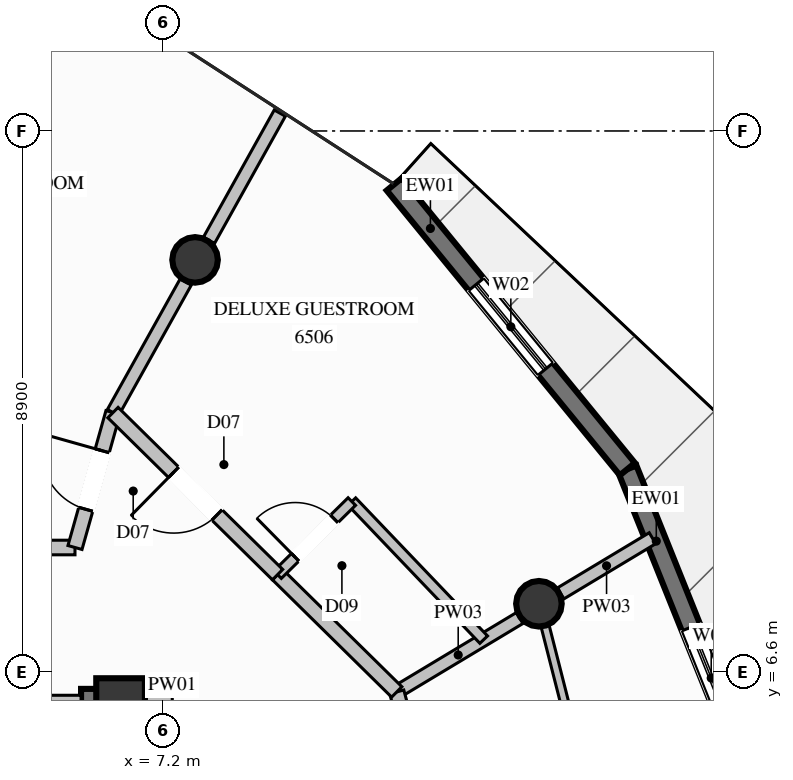
"""IFC4 building model, lengths in metres.
Left out: names, types, materials, properties, quantities, classifications, styles, units other than length and angle.
Written with IfcOpenShell. Run it as: python <this file> out.ifc"""

import sys

from ifc_helpers import new_model, si_unit, direction, frame, frame_2d, origin, origin_2d, place, context, subcontext, project, spatial, rectangle, circle, extrude, element, fill, save


model = new_model("IFC4")
c1 = context("Model", 3, precision=1e-05, world=origin(), true_north=direction((0.0, 1.0)))
c2 = subcontext(c1, "Body", "Model", "MODEL_VIEW")
j1 = project(units=[si_unit("LENGTHUNIT", "METRE"), si_unit("PLANEANGLEUNIT", "RADIAN")], contexts=[c1])
p1 = place(None, origin())
s1 = spatial("IfcSite", under=j1, at=p1, CompositionType="ELEMENT")
p2 = place(p1, origin())
s2 = spatial("IfcBuilding", under=s1, at=p2, CompositionType="ELEMENT")
p3 = place(p2, frame((0.0, 0.0, 243.0)))
s3 = spatial("IfcBuildingStorey", under=s2, at=p3, CompositionType="ELEMENT", Elevation=243.0)
p4 = place(p3, frame((6.5, 6.1, 0.0), z_axis=(0.0, 0.0, 1.0), x_axis=(1.0, 0.0, 0.0)))
e1 = element("IfcColumn", 1, at=p4, inside=s3, PredefinedType="COLUMN", context=c2, shape_type="SweptSolid", body=[
    extrude(rectangle(XDim=0.8, YDim=0.8, at=origin_2d()), origin(), (0.0, 0.0, 1.0), 3.8),
])
p5 = place(p3, frame((5.85, 6.1, 0.0), z_axis=(0.0, 0.0, 1.0), x_axis=(1.0, 0.0, 0.0)))
e2 = element("IfcWall", 2, at=p5, inside=s3, PredefinedType="SHEAR", context=c2, shape_type="SweptSolid", body=[
    extrude(rectangle(XDim=0.425, YDim=0.45, at=frame_2d((0.212, 0.0))), origin(), (0.0, 0.0, 1.0), 3.8),
])
p6 = place(p3, frame((6.5, 3.35, 0.0), z_axis=(0.0, 0.0, 1.0), x_axis=(0.0, 1.0, 0.0)))
e3 = element("IfcWall", 3, at=p6, inside=s3, PredefinedType="SHEAR", context=c2, shape_type="SweptSolid", body=[
    extrude(rectangle(XDim=2.975, YDim=0.45, at=frame_2d((1.487, 0.0))), origin(), (0.0, 0.0, 1.0), 3.8),
])
for number, where, z_axis, x_axis in (
    (4, (13.38, 7.725, 0.0), (0.0, 0.0, 1.0), (1.0, 0.0, 0.0)),
    (5, (7.725, 13.38, 0.0), (0.0, 0.0, 1.0), (1.0, 0.0, 0.0)),
):
    element("IfcColumn", number, at=place(p3, frame(where, z_axis=z_axis, x_axis=x_axis)), inside=s3, PredefinedType="COLUMN", context=c2, shape_type="SweptSolid", body=[
        extrude(circle(Radius=0.375, at=origin_2d()), origin(), (0.0, 0.0, 1.0), 3.8),
    ])
p7 = place(p3, frame((14.835, 9.939, 0.0), z_axis=(0.0, 0.0, 1.0), x_axis=(0.372412492589, -0.928067311871, 0.0)))
e6 = element("IfcWall", 6, at=p7, inside=s3, PredefinedType="SOLIDWALL", context=c2, shape_type="SweptSolid", body=[
    extrude(rectangle(XDim=6.095, YDim=0.32, at=frame_2d((3.048, 0.0))), origin(), (0.0, 0.0, 1.0), 3.57),
])
p8 = place(p7, frame((2.802, 0.0, 0.35)))
e7 = element("IfcOpeningElement", 7, at=p8, cuts=e6, PredefinedType="OPENING", context=c2, shape_type="SweptSolid", body=[
    extrude(rectangle(XDim=1.8, YDim=2.6, at=frame_2d((0.9, 1.3))), frame((0.0, 0.17, 0.0), z_axis=(0.0, -1.0, 0.0), x_axis=(1.0, 0.0, 0.0)), (0.0, 0.0, 1.0), 0.34),
])
p9 = place(p3, frame((11.001, 14.623, 0.0), z_axis=(0.0, 0.0, 1.0), x_axis=(0.633391522875, -0.773831492478, 0.0)))
e8 = element("IfcWall", 8, at=p9, inside=s3, PredefinedType="SOLIDWALL", context=c2, shape_type="SweptSolid", body=[
    extrude(rectangle(XDim=6.053, YDim=0.32, at=frame_2d((3.027, 0.0))), origin(), (0.0, 0.0, 1.0), 3.57),
])
p10 = place(p9, frame((2.127, 0.0, 0.35)))
e9 = element("IfcOpeningElement", 9, at=p10, cuts=e8, PredefinedType="OPENING", context=c2, shape_type="SweptSolid", body=[
    extrude(rectangle(XDim=1.8, YDim=2.6, at=frame_2d((0.9, 1.3))), frame((0.0, 0.17, 0.0), z_axis=(0.0, -1.0, 0.0), x_axis=(1.0, 0.0, 0.0)), (0.0, 0.0, 1.0), 0.34),
])
p11 = place(p3, frame((-5.75, 8.65, 0.0), z_axis=(0.0, 0.0, 1.0), x_axis=(1.0, 0.0, 0.0)))
e10 = element("IfcWall", 10, at=p11, inside=s3, PredefinedType="PARTITIONING", context=c2, shape_type="SweptSolid", body=[
    extrude(rectangle(XDim=11.5, YDim=0.24, at=frame_2d((5.75, 0.0))), origin(), (0.0, 0.0, 1.0), 3.57),
])
p12 = place(p3, frame((3.0, 6.1, 0.0), z_axis=(0.0, 0.0, 1.0), x_axis=(1.0, 0.0, 0.0)))
e11 = element("IfcWall", 11, at=p12, inside=s3, PredefinedType="PARTITIONING", context=c2, shape_type="SweptSolid", body=[
    extrude(rectangle(XDim=2.85, YDim=0.24, at=frame_2d((1.425, 0.0))), origin(), (0.0, 0.0, 1.0), 2.655),
])
p13 = place(p3, frame((6.5, 6.1, 0.0), z_axis=(0.0, 0.0, 1.0), x_axis=(1.0, 0.0, 0.0)))
e12 = element("IfcWall", 12, at=p13, inside=s3, PredefinedType="PARTITIONING", context=c2, shape_type="SweptSolid", body=[
    extrude(rectangle(XDim=0.85, YDim=0.24, at=frame_2d((0.425, 0.0))), origin(), (0.0, 0.0, 1.0), 3.086),
])
p14 = place(p3, frame((11.042, 6.275, 0.0), z_axis=(0.0, 0.0, 1.0), x_axis=(0.857026686246, 0.515272024335, 0.0)))
e13 = element("IfcWall", 13, at=p14, inside=s3, PredefinedType="PARTITIONING", context=c2, shape_type="SweptSolid", body=[
    extrude(rectangle(XDim=2.358, YDim=0.21, at=frame_2d((1.179, 0.0))), origin(), (0.0, 0.0, 1.0), 3.086),
])
p15 = place(p3, frame((13.737, 7.895, 0.0), z_axis=(0.0, 0.0, 1.0), x_axis=(0.857150569961, 0.515065918514, 0.0)))
e14 = element("IfcWall", 14, at=p15, inside=s3, PredefinedType="PARTITIONING", context=c2, shape_type="SweptSolid", body=[
    extrude(rectangle(XDim=1.763, YDim=0.21, at=frame_2d((0.881, 0.0))), origin(), (0.0, 0.0, 1.0), 3.57),
])
p16 = place(p3, frame((6.375, 10.869, 0.0), z_axis=(0.0, 0.0, 1.0), x_axis=(0.486620940413, 0.873613221255, 0.0)))
e15 = element("IfcWall", 15, at=p16, inside=s3, PredefinedType="PARTITIONING", context=c2, shape_type="SweptSolid", body=[
    extrude(rectangle(XDim=2.458, YDim=0.21, at=frame_2d((1.229, 0.0))), origin(), (0.0, 0.0, 1.0), 3.086),
])
p17 = place(p3, frame((7.954, 13.702, 0.0), z_axis=(0.0, 0.0, 1.0), x_axis=(0.486456485885, 0.873704805607, 0.0)))
e16 = element("IfcWall", 16, at=p17, inside=s3, PredefinedType="PARTITIONING", context=c2, shape_type="SweptSolid", body=[
    extrude(rectangle(XDim=2.395, YDim=0.21, at=frame_2d((1.197, 0.0))), origin(), (0.0, 0.0, 1.0), 3.57),
])
p18 = place(p3, frame((5.75, 8.65, 0.0), z_axis=(0.0, 0.0, 1.0), x_axis=(0.271110513922, 0.962548226969, 0.0)))
e17 = element("IfcWall", 17, at=p18, inside=s3, PredefinedType="PARTITIONING", context=c2, shape_type="SweptSolid", body=[
    extrude(rectangle(XDim=2.305, YDim=0.24, at=frame_2d((1.153, 0.0))), origin(), (0.0, 0.0, 1.0), 3.57),
])
p19 = place(p18, frame((0.653, 0.0, 0.0)))
e18 = element("IfcOpeningElement", 18, at=p19, cuts=e17, PredefinedType="OPENING", context=c2, shape_type="SweptSolid", body=[
    extrude(rectangle(XDim=1.0, YDim=2.2, at=frame_2d((0.5, 1.1))), frame((0.0, 0.13, 0.0), z_axis=(0.0, -1.0, 0.0), x_axis=(1.0, 0.0, 0.0)), (0.0, 0.0, 1.0), 0.26),
])
p20 = place(p3, frame((12.75, 0.0, 0.0), z_axis=(0.0, 0.0, 1.0), x_axis=(-0.262640884433, 0.964893655189, 0.0)))
e19 = element("IfcWall", 19, at=p20, inside=s3, PredefinedType="PARTITIONING", context=c2, shape_type="SweptSolid", body=[
    extrude(rectangle(XDim=6.503, YDim=0.24, at=frame_2d((3.251, 0.0))), origin(), (0.0, 0.0, 1.0), 3.57),
])
p21 = place(p3, frame((15.357, 0.0, 0.0), z_axis=(0.0, 0.0, 1.0), x_axis=(-0.246948201866, 0.969028681513, 0.0)))
e20 = element("IfcWall", 20, at=p21, inside=s3, PredefinedType="PARTITIONING", context=c2, shape_type="SweptSolid", body=[
    extrude(rectangle(XDim=7.937, YDim=0.135, at=frame_2d((3.968, 0.0))), origin(), (0.0, 0.0, 1.0), 3.139),
])
p22 = place(p21, frame((3.493, 0.0, 0.0)))
e21 = element("IfcOpeningElement", 21, at=p22, cuts=e20, PredefinedType="OPENING", context=c2, shape_type="SweptSolid", body=[
    extrude(rectangle(XDim=0.95, YDim=2.1, at=frame_2d((0.475, 1.05))), frame((0.0, 0.078, 0.0), z_axis=(0.0, -1.0, 0.0), x_axis=(1.0, 0.0, 0.0)), (0.0, 0.0, 1.0), 0.155),
])
p23 = place(p3, frame((11.042, 6.275, 0.0), z_axis=(0.0, 0.0, 1.0), x_axis=(-0.712677423321, 0.701491903224, 0.0)))
e22 = element("IfcWall", 22, at=p23, inside=s3, PredefinedType="PARTITIONING", context=c2, shape_type="SweptSolid", body=[
    extrude(rectangle(XDim=2.75, YDim=0.24, at=frame_2d((1.375, 0.0))), origin(), (0.0, 0.0, 1.0), 3.57),
])
p24 = place(p3, frame((12.472, 7.135, 0.0), z_axis=(0.0, 0.0, 1.0), x_axis=(-0.690671718567, 0.723168429324, 0.0)))
e23 = element("IfcWall", 23, at=p24, inside=s3, PredefinedType="PLUMBINGWALL", context=c2, shape_type="SweptSolid", body=[
    extrude(rectangle(XDim=3.14, YDim=0.175, at=frame_2d((1.57, 0.0))), origin(), (0.0, 0.0, 1.0), 3.57),
])
p25 = place(p3, frame((9.082, 8.204, 0.0), z_axis=(0.0, 0.0, 1.0), x_axis=(0.712642440828, 0.701527441751, 0.0)))
e24 = element("IfcWall", 24, at=p25, inside=s3, PredefinedType="PLUMBINGWALL", context=c2, shape_type="SweptSolid", body=[
    extrude(rectangle(XDim=1.713, YDim=0.175, at=frame_2d((0.857, 0.0))), origin(), (0.0, 0.0, 1.0), 3.57),
])
p26 = place(p25, frame((0.407, 0.0, 0.0)))
e25 = element("IfcOpeningElement", 25, at=p26, cuts=e24, PredefinedType="OPENING", context=c2, shape_type="SweptSolid", body=[
    extrude(rectangle(XDim=0.9, YDim=2.1, at=frame_2d((0.45, 1.05))), frame((0.0, 0.098, 0.0), z_axis=(0.0, -1.0, 0.0), x_axis=(1.0, 0.0, 0.0)), (0.0, 0.0, 1.0), 0.195),
])
p27 = place(p3, frame((9.082, 8.204, 0.0), z_axis=(0.0, 0.0, 1.0), x_axis=(-0.712644426178, 0.70152542494, 0.0)))
e26 = element("IfcWall", 26, at=p27, inside=s3, PredefinedType="PARTITIONING", context=c2, shape_type="SweptSolid", body=[
    extrude(rectangle(XDim=3.799, YDim=0.24, at=frame_2d((1.899, 0.0))), origin(), (0.0, 0.0, 1.0), 3.57),
])
p28 = place(p27, frame((1.399, 0.0, 0.0)))
e27 = element("IfcOpeningElement", 27, at=p28, cuts=e26, PredefinedType="OPENING", context=c2, shape_type="SweptSolid", body=[
    extrude(rectangle(XDim=1.0, YDim=2.2, at=frame_2d((0.5, 1.1))), frame((0.0, 0.13, 0.0), z_axis=(0.0, -1.0, 0.0), x_axis=(1.0, 0.0, 0.0)), (0.0, 0.0, 1.0), 0.26),
])
p29 = place(p8, origin())
e28 = element("IfcWindow", 28, at=p29, inside=s3, PartitioningType="SINGLE_PANEL", PredefinedType="WINDOW", context=c2, shape_type="SweptSolid", body=[
    extrude(rectangle(XDim=1.8, YDim=2.6, at=frame_2d((0.9, 1.3))), frame((0.0, 0.03, 0.0), z_axis=(0.0, -1.0, 0.0), x_axis=(1.0, 0.0, 0.0)), (0.0, 0.0, 1.0), 0.06),
])
fill(e7, e28)
p30 = place(p10, origin())
e29 = element("IfcWindow", 29, at=p30, inside=s3, PartitioningType="SINGLE_PANEL", PredefinedType="WINDOW", context=c2, shape_type="SweptSolid", body=[
    extrude(rectangle(XDim=1.8, YDim=2.6, at=frame_2d((0.9, 1.3))), frame((0.0, 0.03, 0.0), z_axis=(0.0, -1.0, 0.0), x_axis=(1.0, 0.0, 0.0)), (0.0, 0.0, 1.0), 0.06),
])
fill(e9, e29)
p31 = place(p19, origin())
e30 = element("IfcDoor", 30, at=p31, inside=s3, OperationType="SINGLE_SWING_RIGHT", PredefinedType="DOOR", context=c2, shape_type="SweptSolid", body=[
    extrude(rectangle(XDim=1.0, YDim=2.2, at=frame_2d((0.5, 1.1))), frame((0.0, 0.025, 0.0), z_axis=(0.0, -1.0, 0.0), x_axis=(1.0, 0.0, 0.0)), (0.0, 0.0, 1.0), 0.05),
])
fill(e18, e30)
p32 = place(p26, origin())
e31 = element("IfcDoor", 31, at=p32, inside=s3, OperationType="SINGLE_SWING_LEFT", PredefinedType="DOOR", context=c2, shape_type="SweptSolid", body=[
    extrude(rectangle(XDim=0.9, YDim=2.1, at=frame_2d((0.45, 1.05))), frame((0.0, 0.025, 0.0), z_axis=(0.0, -1.0, 0.0), x_axis=(1.0, 0.0, 0.0)), (0.0, 0.0, 1.0), 0.05),
])
fill(e25, e31)
p33 = place(p28, origin())
e32 = element("IfcDoor", 32, at=p33, inside=s3, OperationType="SINGLE_SWING_RIGHT", PredefinedType="DOOR", context=c2, shape_type="SweptSolid", body=[
    extrude(rectangle(XDim=1.0, YDim=2.2, at=frame_2d((0.5, 1.1))), frame((0.0, 0.025, 0.0), z_axis=(0.0, -1.0, 0.0), x_axis=(1.0, 0.0, 0.0)), (0.0, 0.0, 1.0), 0.05),
])
fill(e27, e32)
save(model, sys.argv[1])
